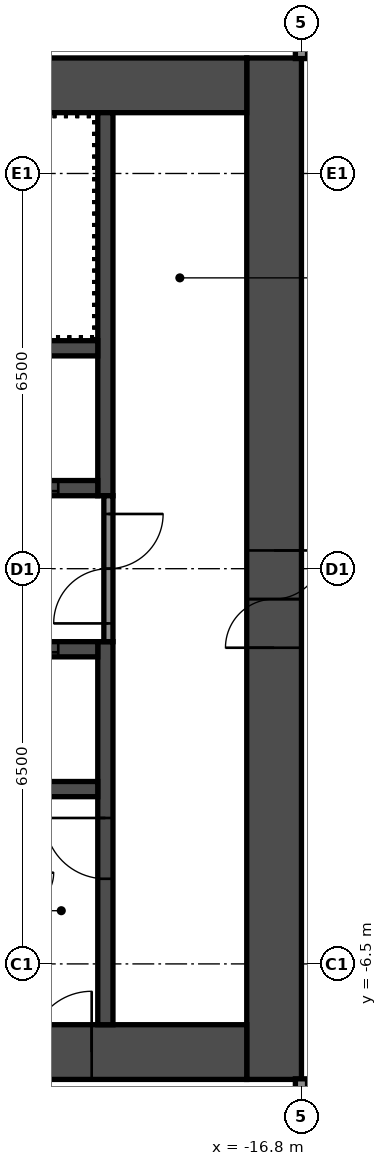
"""IFC4 building model, lengths in metres.
Left out: names, types, materials, properties, quantities, classifications, styles, units other than length and angle.
Written with IfcOpenShell. Run it as: python <this file> out.ifc"""

import sys

from ifc_helpers import new_model, si_unit, direction, frame, frame_2d, origin, place, context, subcontext, project, spatial, rectangle, extrude, element, fill, save


model = new_model("IFC4")
c1 = context("Model", 3, precision=1e-05, world=origin(), true_north=direction((0.0, 1.0)))
c2 = subcontext(c1, "Body", "Model", "MODEL_VIEW")
j1 = project(units=[si_unit("LENGTHUNIT", "METRE"), si_unit("PLANEANGLEUNIT", "RADIAN")], contexts=[c1])
p1 = place(None, origin())
s1 = spatial("IfcSite", under=j1, at=p1, CompositionType="ELEMENT")
p2 = place(p1, origin())
s2 = spatial("IfcBuilding", under=s1, at=p2, CompositionType="ELEMENT")
p3 = place(p2, frame((0.0, 0.0, 124.6)))
s3 = spatial("IfcBuildingStorey", under=s2, at=p3, CompositionType="ELEMENT", Elevation=124.6)
p4 = place(p3, frame((-17.25, -8.4, 0.0), z_axis=(0.0, 0.0, 1.0), x_axis=(0.0, 1.0, 0.0)))
e1 = element("IfcWall", 1, at=p4, inside=s3, PredefinedType="SHEAR", context=c2, shape_type="SweptSolid", body=[
    extrude(rectangle(XDim=16.8, YDim=0.9, at=frame_2d((8.4, 0.0))), origin(), (0.0, 0.0, 1.0), 5.95),
])
p5 = place(p4, frame((7.1, 0.0, 0.0)))
e2 = element("IfcOpeningElement", 2, at=p5, cuts=e1, PredefinedType="OPENING", context=c2, shape_type="SweptSolid", body=[
    extrude(rectangle(XDim=1.6, YDim=2.1, at=frame_2d((0.8, 1.05))), frame((0.0, 0.46, 0.0), z_axis=(0.0, -1.0, 0.0), x_axis=(1.0, 0.0, 0.0)), (0.0, 0.0, 1.0), 0.92),
])
p6 = place(p3, frame((-32.7, 7.95, 0.0), z_axis=(0.0, 0.0, 1.0), x_axis=(1.0, 0.0, 0.0)))
e3 = element("IfcWall", 3, at=p6, inside=s3, PredefinedType="SHEAR", context=c2, shape_type="SweptSolid", body=[
    extrude(rectangle(XDim=15.0, YDim=0.9, at=frame_2d((7.5, 0.0))), origin(), (0.0, 0.0, 1.0), 5.95),
])
p7 = place(p6, frame((3.4, 0.0, 0.0)))
e4 = element("IfcOpeningElement", 4, at=p7, cuts=e3, PredefinedType="OPENING", context=c2, shape_type="SweptSolid", body=[
    extrude(rectangle(XDim=1.2, YDim=2.1, at=frame_2d((0.6, 1.05))), frame((0.0, 0.46, 0.0), z_axis=(0.0, -1.0, 0.0), x_axis=(1.0, 0.0, 0.0)), (0.0, 0.0, 1.0), 0.92),
])
p8 = place(p6, frame((0.75, 0.0, 0.0)))
e5 = element("IfcOpeningElement", 5, at=p8, cuts=e3, PredefinedType="OPENING", context=c2, shape_type="SweptSolid", body=[
    extrude(rectangle(XDim=0.9, YDim=2.1, at=frame_2d((0.45, 1.05))), frame((0.0, 0.46, 0.0), z_axis=(0.0, -1.0, 0.0), x_axis=(1.0, 0.0, 0.0)), (0.0, 0.0, 1.0), 0.92),
])
p9 = place(p3, frame((-32.7, -7.95, 0.0), z_axis=(0.0, 0.0, 1.0), x_axis=(1.0, 0.0, 0.0)))
e6 = element("IfcWall", 6, at=p9, inside=s3, PredefinedType="SHEAR", context=c2, shape_type="SweptSolid", body=[
    extrude(rectangle(XDim=15.0, YDim=0.9, at=frame_2d((7.5, 0.0))), origin(), (0.0, 0.0, 1.0), 5.95),
])
p10 = place(p9, frame((11.45, 0.0, 0.0)))
e7 = element("IfcOpeningElement", 7, at=p10, cuts=e6, PredefinedType="OPENING", context=c2, shape_type="SweptSolid", body=[
    extrude(rectangle(XDim=1.0, YDim=2.1, at=frame_2d((0.5, 1.05))), frame((0.0, 0.46, 0.0), z_axis=(0.0, -1.0, 0.0), x_axis=(1.0, 0.0, 0.0)), (0.0, 0.0, 1.0), 0.92),
])
p11 = place(p3, frame((-20.025, 1.2, 0.0), z_axis=(0.0, 0.0, 1.0), x_axis=(0.0, 1.0, 0.0)))
e8 = element("IfcWall", 8, at=p11, inside=s3, PredefinedType="SHEAR", context=c2, shape_type="SweptSolid", body=[
    extrude(rectangle(XDim=6.3, YDim=0.25, at=frame_2d((3.15, 0.0))), origin(), (0.0, 0.0, 1.0), 5.95),
])
p12 = place(p3, frame((-20.025, -7.5, 0.0), z_axis=(0.0, 0.0, 1.0), x_axis=(0.0, 1.0, 0.0)))
e9 = element("IfcWall", 9, at=p12, inside=s3, PredefinedType="SHEAR", context=c2, shape_type="SweptSolid", body=[
    extrude(rectangle(XDim=6.3, YDim=0.25, at=frame_2d((3.15, 0.0))), origin(), (0.0, 0.0, 1.0), 5.95),
])
p13 = place(p12, frame((2.4, 0.0, 0.0)))
e10 = element("IfcOpeningElement", 10, at=p13, cuts=e9, PredefinedType="OPENING", context=c2, shape_type="SweptSolid", body=[
    extrude(rectangle(XDim=1.0, YDim=2.1, at=frame_2d((0.5, 1.05))), frame((0.0, 0.135, 0.0), z_axis=(0.0, -1.0, 0.0), x_axis=(1.0, 0.0, 0.0)), (0.0, 0.0, 1.0), 0.27),
])
p14 = place(p3, frame((-27.65, 1.325, 0.0), z_axis=(0.0, 0.0, 1.0), x_axis=(1.0, 0.0, 0.0)))
e11 = element("IfcWall", 11, at=p14, inside=s3, PredefinedType="SHEAR", context=c2, shape_type="SweptSolid", body=[
    extrude(rectangle(XDim=7.5, YDim=0.25, at=frame_2d((3.75, 0.0))), origin(), (0.0, 0.0, 1.0), 5.95),
])
p15 = place(p14, frame((5.75, 0.0, 0.0)))
e12 = element("IfcOpeningElement", 12, at=p15, cuts=e11, PredefinedType="OPENING", context=c2, shape_type="SweptSolid", body=[
    extrude(rectangle(XDim=1.1, YDim=2.1, at=frame_2d((0.55, 1.05))), frame((0.0, 0.135, 0.0), z_axis=(0.0, -1.0, 0.0), x_axis=(1.0, 0.0, 0.0)), (0.0, 0.0, 1.0), 0.27),
])
p16 = place(p14, frame((3.35, 0.0, 0.0)))
e13 = element("IfcOpeningElement", 13, at=p16, cuts=e11, PredefinedType="OPENING", context=c2, shape_type="SweptSolid", body=[
    extrude(rectangle(XDim=1.1, YDim=2.1, at=frame_2d((0.55, 1.05))), frame((0.0, 0.135, 0.0), z_axis=(0.0, -1.0, 0.0), x_axis=(1.0, 0.0, 0.0)), (0.0, 0.0, 1.0), 0.27),
])
p17 = place(p14, frame((0.95, 0.0, 0.0)))
e14 = element("IfcOpeningElement", 14, at=p17, cuts=e11, PredefinedType="OPENING", context=c2, shape_type="SweptSolid", body=[
    extrude(rectangle(XDim=1.1, YDim=2.1, at=frame_2d((0.55, 1.05))), frame((0.0, 0.135, 0.0), z_axis=(0.0, -1.0, 0.0), x_axis=(1.0, 0.0, 0.0)), (0.0, 0.0, 1.0), 0.27),
])
p18 = place(p3, frame((-27.65, 3.625, 0.0), z_axis=(0.0, 0.0, 1.0), x_axis=(1.0, 0.0, 0.0)))
e15 = element("IfcWall", 15, at=p18, inside=s3, PredefinedType="SHEAR", context=c2, shape_type="SweptSolid", body=[
    extrude(rectangle(XDim=7.5, YDim=0.25, at=frame_2d((3.75, 0.0))), origin(), (0.0, 0.0, 1.0), 5.95),
])
p19 = place(p3, frame((-27.65, -1.325, 0.0), z_axis=(0.0, 0.0, 1.0), x_axis=(1.0, 0.0, 0.0)))
e16 = element("IfcWall", 16, at=p19, inside=s3, PredefinedType="SHEAR", context=c2, shape_type="SweptSolid", body=[
    extrude(rectangle(XDim=7.5, YDim=0.25, at=frame_2d((3.75, 0.0))), origin(), (0.0, 0.0, 1.0), 5.95),
])
p20 = place(p19, frame((5.75, 0.0, 0.0)))
e17 = element("IfcOpeningElement", 17, at=p20, cuts=e16, PredefinedType="OPENING", context=c2, shape_type="SweptSolid", body=[
    extrude(rectangle(XDim=1.1, YDim=2.1, at=frame_2d((0.55, 1.05))), frame((0.0, 0.135, 0.0), z_axis=(0.0, -1.0, 0.0), x_axis=(1.0, 0.0, 0.0)), (0.0, 0.0, 1.0), 0.27),
])
p21 = place(p19, frame((3.35, 0.0, 0.0)))
e18 = element("IfcOpeningElement", 18, at=p21, cuts=e16, PredefinedType="OPENING", context=c2, shape_type="SweptSolid", body=[
    extrude(rectangle(XDim=1.1, YDim=2.1, at=frame_2d((0.55, 1.05))), frame((0.0, 0.135, 0.0), z_axis=(0.0, -1.0, 0.0), x_axis=(1.0, 0.0, 0.0)), (0.0, 0.0, 1.0), 0.27),
])
p22 = place(p19, frame((0.95, 0.0, 0.0)))
e19 = element("IfcOpeningElement", 19, at=p22, cuts=e16, PredefinedType="OPENING", context=c2, shape_type="SweptSolid", body=[
    extrude(rectangle(XDim=1.1, YDim=2.1, at=frame_2d((0.55, 1.05))), frame((0.0, 0.135, 0.0), z_axis=(0.0, -1.0, 0.0), x_axis=(1.0, 0.0, 0.0)), (0.0, 0.0, 1.0), 0.27),
])
p23 = place(p3, frame((-27.65, -3.625, 0.0), z_axis=(0.0, 0.0, 1.0), x_axis=(1.0, 0.0, 0.0)))
e20 = element("IfcWall", 20, at=p23, inside=s3, PredefinedType="SHEAR", context=c2, shape_type="SweptSolid", body=[
    extrude(rectangle(XDim=7.5, YDim=0.25, at=frame_2d((3.75, 0.0))), origin(), (0.0, 0.0, 1.0), 5.95),
])
p24 = place(p3, frame((-19.975, -1.2, 0.0), z_axis=(0.0, 0.0, 1.0), x_axis=(0.0, 1.0, 0.0)))
e21 = element("IfcWall", 21, at=p24, inside=s3, PredefinedType="PARTITIONING", context=c2, shape_type="SweptSolid", body=[
    extrude(rectangle(XDim=2.4, YDim=0.15, at=frame_2d((1.2, 0.0))), origin(), (0.0, 0.0, 1.0), 5.95),
])
p25 = place(p24, frame((0.3, 0.0, 0.0)))
e22 = element("IfcOpeningElement", 22, at=p25, cuts=e21, PredefinedType="OPENING", context=c2, shape_type="SweptSolid", body=[
    extrude(rectangle(XDim=1.8, YDim=2.1, at=frame_2d((0.9, 1.05))), frame((0.0, 0.085, 0.0), z_axis=(0.0, -1.0, 0.0), x_axis=(1.0, 0.0, 0.0)), (0.0, 0.0, 1.0), 0.17),
])
p26 = place(p3, frame((-16.8, -19.3, 0.0), z_axis=(0.0, 0.0, 1.0), x_axis=(0.0, 1.0, 0.0)))
e23 = element("IfcWall", 23, at=p26, inside=s3, PredefinedType="PARTITIONING", context=c2, shape_type="SweptSolid", body=[
    extrude(rectangle(XDim=10.91, YDim=0.2, at=frame_2d((5.455, 0.0))), origin(), (0.0, 0.0, 1.0), 5.95),
])
p27 = place(p3, frame((-16.8, 8.39, 0.0), z_axis=(0.0, 0.0, 1.0), x_axis=(0.0, 1.0, 0.0)))
e24 = element("IfcWall", 24, at=p27, inside=s3, PredefinedType="PARTITIONING", context=c2, shape_type="SweptSolid", body=[
    extrude(rectangle(XDim=9.91, YDim=0.2, at=frame_2d((4.955, 0.0))), origin(), (0.0, 0.0, 1.0), 5.95),
])
p28 = place(p5, origin())
e25 = element("IfcDoor", 25, at=p28, inside=s3, OperationType="DOUBLE_DOOR_SINGLE_SWING", PredefinedType="DOOR", context=c2, shape_type="SweptSolid", body=[
    extrude(rectangle(XDim=1.6, YDim=2.1, at=frame_2d((0.8, 1.05))), frame((0.0, 0.025, 0.0), z_axis=(0.0, -1.0, 0.0), x_axis=(1.0, 0.0, 0.0)), (0.0, 0.0, 1.0), 0.05),
])
fill(e2, e25)
p29 = place(p10, origin())
e26 = element("IfcDoor", 26, at=p29, inside=s3, OperationType="SINGLE_SWING_LEFT", PredefinedType="DOOR", context=c2, shape_type="SweptSolid", body=[
    extrude(rectangle(XDim=1.0, YDim=2.1, at=frame_2d((0.5, 1.05))), frame((0.0, 0.025, 0.0), z_axis=(0.0, -1.0, 0.0), x_axis=(1.0, 0.0, 0.0)), (0.0, 0.0, 1.0), 0.05),
])
fill(e7, e26)
p30 = place(p13, origin())
e27 = element("IfcDoor", 27, at=p30, inside=s3, OperationType="SINGLE_SWING_LEFT", PredefinedType="DOOR", context=c2, shape_type="SweptSolid", body=[
    extrude(rectangle(XDim=1.0, YDim=2.1, at=frame_2d((0.5, 1.05))), frame((0.0, 0.025, 0.0), z_axis=(0.0, -1.0, 0.0), x_axis=(1.0, 0.0, 0.0)), (0.0, 0.0, 1.0), 0.05),
])
fill(e10, e27)
p31 = place(p25, origin())
e28 = element("IfcDoor", 28, at=p31, inside=s3, OperationType="DOUBLE_DOOR_SINGLE_SWING", PredefinedType="DOOR", context=c2, shape_type="SweptSolid", body=[
    extrude(rectangle(XDim=1.8, YDim=2.1, at=frame_2d((0.9, 1.05))), frame((0.0, 0.025, 0.0), z_axis=(0.0, -1.0, 0.0), x_axis=(1.0, 0.0, 0.0)), (0.0, 0.0, 1.0), 0.05),
])
fill(e22, e28)
p32 = place(p15, origin())
e29 = element("IfcDoor", 29, at=p32, inside=s3, OperationType="DOUBLE_DOOR_SLIDING", PredefinedType="DOOR", context=c2, shape_type="SweptSolid", body=[
    extrude(rectangle(XDim=1.1, YDim=2.1, at=frame_2d((0.55, 1.05))), frame((0.0, 0.025, 0.0), z_axis=(0.0, -1.0, 0.0), x_axis=(1.0, 0.0, 0.0)), (0.0, 0.0, 1.0), 0.05),
])
fill(e12, e29)
p33 = place(p20, origin())
e30 = element("IfcDoor", 30, at=p33, inside=s3, OperationType="DOUBLE_DOOR_SLIDING", PredefinedType="DOOR", context=c2, shape_type="SweptSolid", body=[
    extrude(rectangle(XDim=1.1, YDim=2.1, at=frame_2d((0.55, 1.05))), frame((0.0, 0.025, 0.0), z_axis=(0.0, -1.0, 0.0), x_axis=(1.0, 0.0, 0.0)), (0.0, 0.0, 1.0), 0.05),
])
fill(e17, e30)
save(model, sys.argv[1])
